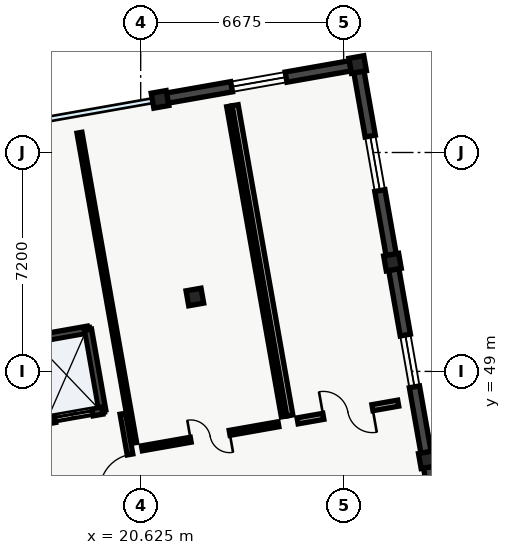
"""IFC4 building model, lengths in metres.
Left out: names, types, materials, properties, quantities, classifications, styles, units other than length and angle.
Written with IfcOpenShell. Run it as: python <this file> out.ifc"""

import sys

from ifc_helpers import new_model, si_unit, direction, frame, frame_2d, origin, origin_2d, place, context, subcontext, project, spatial, polyline, rectangle, outline, extrude, element, fill, save


model = new_model("IFC4")
c1 = context("Model", 3, precision=1e-05, world=origin(), true_north=direction((0.0, 1.0)))
c2 = subcontext(c1, "Body", "Model", "MODEL_VIEW")
j1 = project(units=[si_unit("LENGTHUNIT", "METRE"), si_unit("PLANEANGLEUNIT", "RADIAN")], contexts=[c1])
p1 = place(None, origin())
s1 = spatial("IfcSite", under=j1, at=p1, CompositionType="ELEMENT")
p2 = place(p1, origin())
s2 = spatial("IfcBuilding", under=s1, at=p2, CompositionType="ELEMENT")
p3 = place(p2, frame((0.0, 0.0, 49.2)))
s3 = spatial("IfcBuildingStorey", under=s2, at=p3, CompositionType="ELEMENT", Elevation=49.2)
for number, where, z_axis, x_axis in (
    (1, (22.407, 51.448, 0.0), (0.0, 0.0, 1.0), (0.985, 0.174, 0.0)),
    (2, (21.261, 57.948, 0.0), (0.0, 0.0, 1.0), (0.985, 0.174, 0.0)),
    (3, (30.053, 46.094, 0.0), (0.0, 0.0, 1.0), (0.985, 0.174, 0.0)),
    (4, (28.907, 52.594, 0.0), (0.0, 0.0, 1.0), (0.985, 0.174, 0.0)),
    (5, (27.761, 59.094, 0.0), (0.0, 0.0, 1.0), (0.985, 0.174, 0.0)),
):
    element("IfcColumn", number, at=place(p3, frame(where, z_axis=z_axis, x_axis=x_axis)), inside=s3, PredefinedType="COLUMN", context=c2, shape_type="SweptSolid", body=[
        extrude(rectangle(XDim=0.5, YDim=0.5, at=origin_2d()), origin(), (0.0, 0.0, 1.0), 4.2),
    ])
p4 = place(p3, frame((21.502, 57.99, 0.0), z_axis=(0.0, 0.0, 1.0), x_axis=(0.984807282173, 0.173650847905, 0.0)))
e6 = element("IfcWall", 6, at=p4, inside=s3, PredefinedType="SOLIDWALL", context=c2, shape_type="SweptSolid", body=[
    extrude(rectangle(XDim=6.11, YDim=0.34, at=frame_2d((3.055, 0.0))), origin(), (0.0, 0.0, 1.0), 7.42),
])
p5 = place(p4, frame((2.145, 0.0, 0.95)))
e7 = element("IfcOpeningElement", 7, at=p5, cuts=e6, PredefinedType="OPENING", context=c2, shape_type="SweptSolid", body=[
    extrude(rectangle(XDim=1.82, YDim=1.38, at=frame_2d((0.91, 0.69))), frame((0.0, 0.17, 0.0), z_axis=(0.0, -1.0, 0.0), x_axis=(1.0, 0.0, 0.0)), (0.0, 0.0, 1.0), 0.34),
])
p6 = place(p3, frame((27.803, 58.852, 0.0), z_axis=(0.0, 0.0, 1.0), x_axis=(0.173650847905, -0.984807282173, 0.0)))
e8 = element("IfcWall", 8, at=p6, inside=s3, PredefinedType="SOLIDWALL", context=c2, shape_type="SweptSolid", body=[
    extrude(outline(polyline([(0.0, 0.0), (6.11, 0.0), (6.11, 6.666), (0.0, 7.901), (0.0, 0.0)])), frame((0.0, 0.17, 0.0), z_axis=(0.0, -1.0, 0.0), x_axis=(1.0, 0.0, 0.0)), (0.0, 0.0, 1.0), 0.34),
])
p7 = place(p6, frame((2.145, 0.0, 0.95)))
e9 = element("IfcOpeningElement", 9, at=p7, cuts=e8, PredefinedType="OPENING", context=c2, shape_type="SweptSolid", body=[
    extrude(rectangle(XDim=1.82, YDim=1.38, at=frame_2d((0.91, 0.69))), frame((0.0, 0.17, 0.0), z_axis=(0.0, -1.0, 0.0), x_axis=(1.0, 0.0, 0.0)), (0.0, 0.0, 1.0), 0.34),
])
p8 = place(p3, frame((28.949, 52.353, 0.0), z_axis=(0.0, 0.0, 1.0), x_axis=(0.173650847905, -0.984807282173, 0.0)))
e10 = element("IfcWall", 10, at=p8, inside=s3, PredefinedType="SOLIDWALL", context=c2, shape_type="SweptSolid", body=[
    extrude(outline(polyline([(0.0, 0.0), (6.11, 0.0), (6.11, 5.333), (0.0, 6.567), (0.0, 0.0)])), frame((0.0, 0.17, 0.0), z_axis=(0.0, -1.0, 0.0), x_axis=(1.0, 0.0, 0.0)), (0.0, 0.0, 1.0), 0.34),
])
p9 = place(p8, frame((2.19, 0.0, 0.95)))
e11 = element("IfcOpeningElement", 11, at=p9, cuts=e10, PredefinedType="OPENING", context=c2, shape_type="SweptSolid", body=[
    extrude(rectangle(XDim=1.73, YDim=1.36, at=frame_2d((0.865, 0.68))), frame((0.0, 0.17, 0.0), z_axis=(0.0, -1.0, 0.0), x_axis=(1.0, 0.0, 0.0)), (0.0, 0.0, 1.0), 0.34),
])
p10 = place(p3, frame((30.095, 45.853, 0.0), z_axis=(0.0, 0.0, 1.0), x_axis=(0.173657681232, -0.98480607723, 0.0)))
e12 = element("IfcWall", 12, at=p10, inside=s3, PredefinedType="SOLIDWALL", context=c2, shape_type="SweptSolid", body=[
    extrude(outline(polyline([(0.0, 0.0), (6.11, 0.0), (6.11, 4.0), (0.0, 5.234), (0.0, 0.0)])), frame((0.0, 0.17, 0.0), z_axis=(0.0, -1.0, 0.0), x_axis=(1.0, 0.0, 0.0)), (0.0, 0.0, 1.0), 0.34),
])
p11 = place(p10, frame((2.235, 0.0, 0.95)))
e13 = element("IfcOpeningElement", 13, at=p11, cuts=e12, PredefinedType="OPENING", context=c2, shape_type="SweptSolid", body=[
    extrude(rectangle(XDim=1.64, YDim=1.48, at=frame_2d((0.82, 0.74))), frame((0.0, 0.17, 0.0), z_axis=(0.0, -1.0, 0.0), x_axis=(1.0, 0.0, 0.0)), (0.0, 0.0, 1.0), 0.34),
])
p12 = place(p3, frame((17.02, 50.041, 0.0), z_axis=(0.0, 0.0, 1.0), x_axis=(0.984815882103, 0.173602068988, 0.0)))
e14 = element("IfcWall", 14, at=p12, inside=s3, PredefinedType="SHEAR", context=c2, shape_type="SweptSolid", body=[
    extrude(rectangle(XDim=1.9, YDim=0.24, at=frame_2d((0.95, 0.0))), origin(), (0.0, 0.0, 1.0), 4.35),
])
p13 = place(p3, frame((18.891, 50.371, 0.0), z_axis=(0.0, 0.0, 1.0), x_axis=(0.173615102578, -0.98481358447, 0.0)))
e15 = element("IfcWall", 15, at=p13, inside=s3, PredefinedType="SHEAR", context=c2, shape_type="SweptSolid", body=[
    extrude(rectangle(XDim=2.7, YDim=0.24, at=frame_2d((1.35, 0.0))), origin(), (0.0, 0.0, 1.0), 4.35),
])
p14 = place(p3, frame((19.359, 47.712, 0.0), z_axis=(0.0, 0.0, 1.0), x_axis=(-0.984815882103, -0.173602068988, 0.0)))
e16 = element("IfcWall", 16, at=p14, inside=s3, PredefinedType="SHEAR", context=c2, shape_type="SweptSolid", body=[
    extrude(rectangle(XDim=1.9, YDim=0.24, at=frame_2d((0.95, 0.0))), origin(), (0.0, 0.0, 1.0), 4.35),
])
p15 = place(p14, frame((0.325, 0.0, 0.0)))
e17 = element("IfcOpeningElement", 17, at=p15, cuts=e16, PredefinedType="OPENING", context=c2, shape_type="SweptSolid", body=[
    extrude(rectangle(XDim=1.25, YDim=2.2, at=frame_2d((0.625, 1.1))), frame((0.0, 0.12, 0.0), z_axis=(0.0, -1.0, 0.0), x_axis=(1.0, 0.0, 0.0)), (0.0, 0.0, 1.0), 0.24),
])
p16 = place(p3, frame((20.63, 44.25, 0.0), z_axis=(0.0, 0.0, 1.0), x_axis=(-0.173621956536, 0.984812376145, 0.0)))
e18 = element("IfcWall", 18, at=p16, inside=s3, PredefinedType="SOLIDWALL", context=c2, shape_type="SweptSolid", body=[
    extrude(rectangle(XDim=3.41, YDim=0.185, at=frame_2d((1.705, 0.0))), origin(), (0.0, 0.0, 1.0), 3.65),
])
p17 = place(p16, frame((0.85, 0.0, 0.0)))
e19 = element("IfcOpeningElement", 19, at=p17, cuts=e18, PredefinedType="OPENING", context=c2, shape_type="SweptSolid", body=[
    extrude(rectangle(XDim=1.2, YDim=2.15, at=frame_2d((0.6, 1.075))), frame((0.0, 0.093, 0.0), z_axis=(0.0, -1.0, 0.0), x_axis=(1.0, 0.0, 0.0)), (0.0, 0.0, 1.0), 0.185),
])
p18 = place(p3, frame((20.665, 46.469, 0.0), z_axis=(0.0, 0.0, 1.0), x_axis=(0.984801878875, 0.173681488261, 0.0)))
e20 = element("IfcWall", 20, at=p18, inside=s3, PredefinedType="PARTITIONING", context=c2, shape_type="SweptSolid", body=[
    extrude(rectangle(XDim=4.56, YDim=0.165, at=frame_2d((2.28, 0.0))), origin(), (0.0, 0.0, 1.0), 3.65),
])
p19 = place(p18, frame((1.63, 0.0, 0.0)))
e21 = element("IfcOpeningElement", 21, at=p19, cuts=e20, PredefinedType="OPENING", context=c2, shape_type="SweptSolid", body=[
    extrude(rectangle(XDim=1.3, YDim=2.18, at=frame_2d((0.65, 1.09))), frame((0.0, 0.083, 0.0), z_axis=(0.0, -1.0, 0.0), x_axis=(1.0, 0.0, 0.0)), (0.0, 0.0, 1.0), 0.165),
])
p20 = place(p3, frame((25.334, 47.516, 0.0), z_axis=(0.0, 0.0, 1.0), x_axis=(-0.173658960975, 0.984805851563, 0.0)))
e22 = element("IfcWall", 22, at=p20, inside=s3, PredefinedType="PARTITIONING", context=c2, shape_type="SweptSolid", body=[
    extrude(rectangle(XDim=10.36, YDim=0.165, at=frame_2d((5.18, 0.0))), origin(), (0.0, 0.0, 1.0), 3.65),
])
p21 = place(p3, frame((18.611, 56.851, 0.0), z_axis=(0.0, 0.0, 1.0), x_axis=(0.173654930775, -0.984806562233, 0.0)))
e23 = element("IfcWall", 23, at=p21, inside=s3, PredefinedType="PARTITIONING", context=c2, shape_type="SweptSolid", body=[
    extrude(rectangle(XDim=10.36, YDim=0.165, at=frame_2d((5.18, 0.0))), origin(), (0.0, 0.0, 1.0), 3.65),
])
p22 = place(p3, frame((25.786, 47.373, 0.0), z_axis=(0.0, 0.0, 1.0), x_axis=(0.984804765243, 0.173665121296, 0.0)))
e24 = element("IfcWall", 24, at=p22, inside=s3, PredefinedType="SOLIDWALL", context=c2, shape_type="SweptSolid", body=[
    extrude(rectangle(XDim=3.36, YDim=0.2, at=frame_2d((1.68, 0.0))), origin(), (0.0, 0.0, 1.0), 3.65),
])
p23 = place(p22, frame((0.86, 0.0, 0.0)))
e25 = element("IfcOpeningElement", 25, at=p23, cuts=e24, PredefinedType="OPENING", context=c2, shape_type="SweptSolid", body=[
    extrude(rectangle(XDim=1.64, YDim=2.2, at=frame_2d((0.82, 1.1))), frame((0.0, 0.1, 0.0), z_axis=(0.0, -1.0, 0.0), x_axis=(1.0, 0.0, 0.0)), (0.0, 0.0, 1.0), 0.2),
])
p24 = place(p3, frame((23.732, 57.754, 0.0), z_axis=(0.0, 0.0, 1.0), x_axis=(0.173654930775, -0.984806562233, 0.0)))
e26 = element("IfcWall", 26, at=p24, inside=s3, PredefinedType="SOLIDWALL", context=c2, shape_type="SweptSolid", body=[
    extrude(rectangle(XDim=10.36, YDim=0.2, at=frame_2d((5.18, 0.0))), origin(), (0.0, 0.0, 1.0), 3.65),
])
p25 = place(p5, origin())
e27 = element("IfcWindow", 27, at=p25, inside=s3, PartitioningType="SINGLE_PANEL", PredefinedType="WINDOW", context=c2, shape_type="SweptSolid", body=[
    extrude(rectangle(XDim=1.82, YDim=1.38, at=frame_2d((0.91, 0.69))), frame((0.0, 0.03, 0.0), z_axis=(0.0, -1.0, 0.0), x_axis=(1.0, 0.0, 0.0)), (0.0, 0.0, 1.0), 0.06),
])
fill(e7, e27)
p26 = place(p7, origin())
e28 = element("IfcWindow", 28, at=p26, inside=s3, PartitioningType="SINGLE_PANEL", PredefinedType="WINDOW", context=c2, shape_type="SweptSolid", body=[
    extrude(rectangle(XDim=1.82, YDim=1.38, at=frame_2d((0.91, 0.69))), frame((0.0, 0.03, 0.0), z_axis=(0.0, -1.0, 0.0), x_axis=(1.0, 0.0, 0.0)), (0.0, 0.0, 1.0), 0.06),
])
fill(e9, e28)
p27 = place(p9, origin())
e29 = element("IfcWindow", 29, at=p27, inside=s3, PartitioningType="SINGLE_PANEL", PredefinedType="WINDOW", context=c2, shape_type="SweptSolid", body=[
    extrude(rectangle(XDim=1.73, YDim=1.36, at=frame_2d((0.865, 0.68))), frame((0.0, 0.03, 0.0), z_axis=(0.0, -1.0, 0.0), x_axis=(1.0, 0.0, 0.0)), (0.0, 0.0, 1.0), 0.06),
])
fill(e11, e29)
p28 = place(p15, origin())
e30 = element("IfcDoor", 30, at=p28, inside=s3, OperationType="SLIDING_TO_RIGHT", PredefinedType="DOOR", context=c2, shape_type="SweptSolid", body=[
    extrude(rectangle(XDim=1.25, YDim=2.2, at=frame_2d((0.625, 1.1))), frame((0.0, 0.025, 0.0), z_axis=(0.0, -1.0, 0.0), x_axis=(1.0, 0.0, 0.0)), (0.0, 0.0, 1.0), 0.05),
])
fill(e17, e30)
p29 = place(p17, origin())
e31 = element("IfcDoor", 31, at=p29, inside=s3, OperationType="SINGLE_SWING_LEFT", PredefinedType="DOOR", context=c2, shape_type="SweptSolid", body=[
    extrude(rectangle(XDim=1.2, YDim=2.15, at=frame_2d((0.6, 1.075))), frame((0.0, 0.025, 0.0), z_axis=(0.0, -1.0, 0.0), x_axis=(1.0, 0.0, 0.0)), (0.0, 0.0, 1.0), 0.05),
])
fill(e19, e31)
p30 = place(p19, origin())
e32 = element("IfcDoor", 32, at=p30, inside=s3, OperationType="DOUBLE_DOOR_SINGLE_SWING", PredefinedType="DOOR", context=c2, shape_type="SweptSolid", body=[
    extrude(rectangle(XDim=1.3, YDim=2.18, at=frame_2d((0.65, 1.09))), frame((0.0, 0.025, 0.0), z_axis=(0.0, -1.0, 0.0), x_axis=(1.0, 0.0, 0.0)), (0.0, 0.0, 1.0), 0.05),
])
fill(e21, e32)
p31 = place(p23, origin())
e33 = element("IfcDoor", 33, at=p31, inside=s3, OperationType="DOUBLE_DOOR_SINGLE_SWING", PredefinedType="DOOR", context=c2, shape_type="SweptSolid", body=[
    extrude(rectangle(XDim=1.64, YDim=2.2, at=frame_2d((0.82, 1.1))), frame((0.0, 0.025, 0.0), z_axis=(0.0, -1.0, 0.0), x_axis=(1.0, 0.0, 0.0)), (0.0, 0.0, 1.0), 0.05),
])
fill(e25, e33)
save(model, sys.argv[1])
